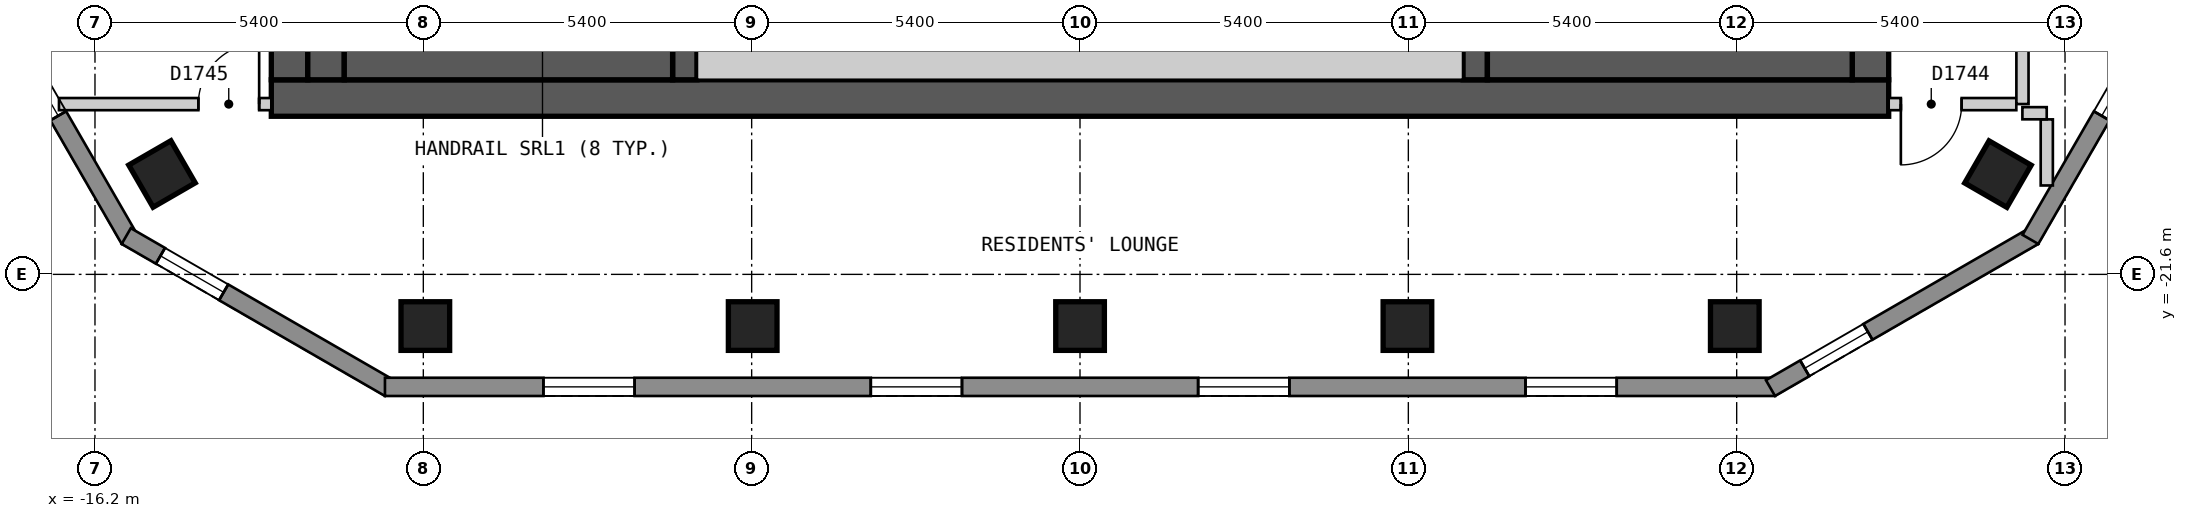
"""IFC4 building model, lengths in metres.
Left out: names, types, materials, properties, quantities, classifications, styles, units other than length and angle.
Written with IfcOpenShell. Run it as: python <this file> out.ifc"""

import sys

from ifc_helpers import new_model, si_unit, direction, frame, frame_2d, origin, origin_2d, place, context, subcontext, project, spatial, polyline, rectangle, outline, extrude, element, fill, save


model = new_model("IFC4")
c1 = context("Model", 3, precision=1e-05, world=origin(), true_north=direction((0.0, 1.0)))
c2 = subcontext(c1, "Body", "Model", "MODEL_VIEW")
j1 = project(units=[si_unit("LENGTHUNIT", "METRE"), si_unit("PLANEANGLEUNIT", "RADIAN")], contexts=[c1])
p1 = place(None, origin())
s1 = spatial("IfcSite", under=j1, at=p1, CompositionType="ELEMENT")
p2 = place(p1, origin())
s2 = spatial("IfcBuilding", under=s1, at=p2, CompositionType="ELEMENT")
p3 = place(p2, frame((0.0, 0.0, 187.2)))
s3 = spatial("IfcBuildingStorey", under=s2, at=p3, CompositionType="ELEMENT", Elevation=187.2)
for number, where, z_axis, x_axis in (
    (1, (-15.098, -19.949, 0.0), (0.0, 0.0, 1.0), (0.5, -0.866, 0.0)),
    (2, (-10.767, -22.45, 0.0), (0.0, 0.0, 1.0), (1.0, 0.0, 0.0)),
    (3, (-5.383, -22.45, 0.0), (0.0, 0.0, 1.0), (1.0, 0.0, 0.0)),
    (4, (0.001, -22.45, 0.0), (0.0, 0.0, 1.0), (1.0, 0.0, 0.0)),
    (5, (5.385, -22.45, 0.0), (0.0, 0.0, 1.0), (1.0, 0.0, 0.0)),
    (6, (10.769, -22.45, 0.0), (0.0, 0.0, 1.0), (1.0, 0.0, 0.0)),
    (7, (15.097, -19.951, 0.0), (0.0, 0.0, 1.0), (0.5, 0.866, 0.0)),
):
    element("IfcColumn", number, at=place(p3, frame(where, z_axis=z_axis, x_axis=x_axis)), inside=s3, PredefinedType="COLUMN", context=c2, shape_type="SweptSolid", body=[
        extrude(rectangle(XDim=0.8, YDim=0.8, at=origin_2d()), origin(), (0.0, 0.0, 1.0), 3.0),
    ])
p4 = place(p3, frame((-13.3, -18.7, 0.0), z_axis=(0.0, 0.0, 1.0), x_axis=(1.0, 0.0, 0.0)))
e8 = element("IfcWall", 8, at=p4, inside=s3, PredefinedType="SHEAR", context=c2, shape_type="SweptSolid", body=[
    extrude(rectangle(XDim=26.6, YDim=0.6, at=frame_2d((13.3, 0.0))), origin(), (0.0, 0.0, 1.0), 2.7),
])
p5 = place(p3, frame((-13.0, -18.4, 0.0), z_axis=(0.0, 0.0, 1.0), x_axis=(0.0, 1.0, 0.0)))
e9 = element("IfcWall", 9, at=p5, inside=s3, PredefinedType="SHEAR", context=c2, shape_type="SweptSolid", body=[
    extrude(rectangle(XDim=12.8, YDim=0.6, at=frame_2d((6.4, 0.0))), origin(), (0.0, 0.0, 1.0), 2.7),
])
p6 = place(p5, frame((4.2, 0.0, 0.0)))
e10 = element("IfcOpeningElement", 10, at=p6, cuts=e9, PredefinedType="OPENING", context=c2, shape_type="SweptSolid", body=[
    extrude(rectangle(XDim=1.2, YDim=2.1, at=frame_2d((0.6, 1.05))), frame((0.0, 0.31, 0.0), z_axis=(0.0, -1.0, 0.0), x_axis=(1.0, 0.0, 0.0)), (0.0, 0.0, 1.0), 0.62),
])
p7 = place(p3, frame((13.0, -18.4, 0.0), z_axis=(0.0, 0.0, 1.0), x_axis=(0.0, 1.0, 0.0)))
e11 = element("IfcWall", 11, at=p7, inside=s3, PredefinedType="SHEAR", context=c2, shape_type="SweptSolid", body=[
    extrude(rectangle(XDim=12.8, YDim=0.6, at=frame_2d((6.4, 0.0))), origin(), (0.0, 0.0, 1.0), 2.7),
])
for number, where, z_axis, x_axis in (
    (12, (-6.5, -18.4, 0.0), (0.0, 0.0, 1.0), (0.0, 1.0, 0.0)),
    (13, (6.5, -18.4, 0.0), (0.0, 0.0, 1.0), (0.0, 1.0, 0.0)),
):
    element("IfcWall", number, at=place(p3, frame(where, z_axis=z_axis, x_axis=x_axis)), inside=s3, PredefinedType="SHEAR", context=c2, shape_type="SweptSolid", body=[
        extrude(rectangle(XDim=3.55, YDim=0.4, at=frame_2d((1.775, 0.0))), origin(), (0.0, 0.0, 1.0), 2.7),
    ])
p8 = place(p3, frame((-26.024, -3.025, 0.0), z_axis=(0.0, 0.0, 1.0), x_axis=(0.500018670445, -0.86601462413, 0.0)))
e14 = element("IfcWall", 14, at=p8, inside=s3, PredefinedType="SOLIDWALL", context=c2, shape_type="SweptSolid", body=[
    extrude(outline(polyline([(0.0, -0.15), (20.785, -0.15), (20.705, 0.15), (0.08, 0.15), (0.0, -0.15)])), origin(), (0.0, 0.0, 1.0), 2.7),
])
p9 = place(p8, frame((2.346, 0.0, 0.15)))
e15 = element("IfcOpeningElement", 15, at=p9, cuts=e14, PredefinedType="OPENING", context=c2, shape_type="SweptSolid", body=[
    extrude(rectangle(XDim=1.5, YDim=2.1, at=frame_2d((0.75, 1.05))), frame((0.0, 0.16, 0.0), z_axis=(0.0, -1.0, 0.0), x_axis=(1.0, 0.0, 0.0)), (0.0, 0.0, 1.0), 0.32),
])
p10 = place(p8, frame((7.21, 0.0, 0.15)))
e16 = element("IfcOpeningElement", 16, at=p10, cuts=e14, PredefinedType="OPENING", context=c2, shape_type="SweptSolid", body=[
    extrude(rectangle(XDim=1.5, YDim=2.1, at=frame_2d((0.75, 1.05))), frame((0.0, 0.16, 0.0), z_axis=(0.0, -1.0, 0.0), x_axis=(1.0, 0.0, 0.0)), (0.0, 0.0, 1.0), 0.32),
])
p11 = place(p8, frame((12.073, 0.0, 0.15)))
e17 = element("IfcOpeningElement", 17, at=p11, cuts=e14, PredefinedType="OPENING", context=c2, shape_type="SweptSolid", body=[
    extrude(rectangle(XDim=1.5, YDim=2.1, at=frame_2d((0.75, 1.05))), frame((0.0, 0.16, 0.0), z_axis=(0.0, -1.0, 0.0), x_axis=(1.0, 0.0, 0.0)), (0.0, 0.0, 1.0), 0.32),
])
p12 = place(p8, frame((16.938, 0.0, 0.15)))
e18 = element("IfcOpeningElement", 18, at=p12, cuts=e14, PredefinedType="OPENING", context=c2, shape_type="SweptSolid", body=[
    extrude(rectangle(XDim=1.5, YDim=2.1, at=frame_2d((0.75, 1.05))), frame((0.0, 0.16, 0.0), z_axis=(0.0, -1.0, 0.0), x_axis=(1.0, 0.0, 0.0)), (0.0, 0.0, 1.0), 0.32),
])
p13 = place(p3, frame((-15.686, -20.97, 0.0), z_axis=(0.0, 0.0, 1.0), x_axis=(0.866022959057, -0.500004234368, 0.0)))
e19 = element("IfcWall", 19, at=p13, inside=s3, PredefinedType="SOLIDWALL", context=c2, shape_type="SweptSolid", body=[
    extrude(outline(polyline([(0.0, -0.15), (5.0, -0.15), (4.92, 0.15), (0.08, 0.15), (0.0, -0.15)])), origin(), (0.0, 0.0, 1.0), 2.7),
])
p14 = place(p13, frame((0.65, 0.0, 0.15)))
e20 = element("IfcOpeningElement", 20, at=p14, cuts=e19, PredefinedType="OPENING", context=c2, shape_type="SweptSolid", body=[
    extrude(rectangle(XDim=1.2, YDim=2.1, at=frame_2d((0.6, 1.05))), frame((0.0, 0.16, 0.0), z_axis=(0.0, -1.0, 0.0), x_axis=(1.0, 0.0, 0.0)), (0.0, 0.0, 1.0), 0.32),
])
p15 = place(p3, frame((-11.431, -23.45, 0.0), z_axis=(0.0, 0.0, 1.0), x_axis=(1.0, 0.0, 0.0)))
e21 = element("IfcWall", 21, at=p15, inside=s3, PredefinedType="SOLIDWALL", context=c2, shape_type="SweptSolid", body=[
    extrude(outline(polyline([(0.0, -0.15), (22.862, -0.15), (22.781, 0.15), (0.08, 0.15), (0.0, -0.15)])), origin(), (0.0, 0.0, 1.0), 2.7),
])
p16 = place(p15, frame((2.606, 0.0, 0.15)))
e22 = element("IfcOpeningElement", 22, at=p16, cuts=e21, PredefinedType="OPENING", context=c2, shape_type="SweptSolid", body=[
    extrude(rectangle(XDim=1.5, YDim=2.1, at=frame_2d((0.75, 1.05))), frame((0.0, 0.16, 0.0), z_axis=(0.0, -1.0, 0.0), x_axis=(1.0, 0.0, 0.0)), (0.0, 0.0, 1.0), 0.32),
])
p17 = place(p15, frame((7.99, 0.0, 0.15)))
e23 = element("IfcOpeningElement", 23, at=p17, cuts=e21, PredefinedType="OPENING", context=c2, shape_type="SweptSolid", body=[
    extrude(rectangle(XDim=1.5, YDim=2.1, at=frame_2d((0.75, 1.05))), frame((0.0, 0.16, 0.0), z_axis=(0.0, -1.0, 0.0), x_axis=(1.0, 0.0, 0.0)), (0.0, 0.0, 1.0), 0.32),
])
p18 = place(p15, frame((13.374, 0.0, 0.15)))
e24 = element("IfcOpeningElement", 24, at=p18, cuts=e21, PredefinedType="OPENING", context=c2, shape_type="SweptSolid", body=[
    extrude(rectangle(XDim=1.5, YDim=2.1, at=frame_2d((0.75, 1.05))), frame((0.0, 0.16, 0.0), z_axis=(0.0, -1.0, 0.0), x_axis=(1.0, 0.0, 0.0)), (0.0, 0.0, 1.0), 0.32),
])
p19 = place(p15, frame((18.758, 0.0, 0.15)))
e25 = element("IfcOpeningElement", 25, at=p19, cuts=e21, PredefinedType="OPENING", context=c2, shape_type="SweptSolid", body=[
    extrude(rectangle(XDim=1.5, YDim=2.1, at=frame_2d((0.75, 1.05))), frame((0.0, 0.16, 0.0), z_axis=(0.0, -1.0, 0.0), x_axis=(1.0, 0.0, 0.0)), (0.0, 0.0, 1.0), 0.32),
])
p20 = place(p3, frame((11.356, -23.47, 0.0), z_axis=(0.0, 0.0, 1.0), x_axis=(0.866022959057, 0.500004234368, 0.0)))
e26 = element("IfcWall", 26, at=p20, inside=s3, PredefinedType="SOLIDWALL", context=c2, shape_type="SweptSolid", body=[
    extrude(outline(polyline([(0.0, -0.15), (5.0, -0.15), (4.92, 0.15), (0.08, 0.15), (0.0, -0.15)])), origin(), (0.0, 0.0, 1.0), 2.7),
])
p21 = place(p20, frame((0.65, 0.0, 0.15)))
e27 = element("IfcOpeningElement", 27, at=p21, cuts=e26, PredefinedType="OPENING", context=c2, shape_type="SweptSolid", body=[
    extrude(rectangle(XDim=1.2, YDim=2.1, at=frame_2d((0.6, 1.05))), frame((0.0, 0.16, 0.0), z_axis=(0.0, -1.0, 0.0), x_axis=(1.0, 0.0, 0.0)), (0.0, 0.0, 1.0), 0.32),
])
p22 = place(p3, frame((15.631, -21.025, 0.0), z_axis=(0.0, 0.0, 1.0), x_axis=(0.500018670445, 0.86601462413, 0.0)))
e28 = element("IfcWall", 28, at=p22, inside=s3, PredefinedType="SOLIDWALL", context=c2, shape_type="SweptSolid", body=[
    extrude(outline(polyline([(0.0, -0.15), (20.785, -0.15), (20.705, 0.15), (0.08, 0.15), (0.0, -0.15)])), origin(), (0.0, 0.0, 1.0), 2.7),
])
p23 = place(p22, frame((2.346, 0.0, 0.15)))
e29 = element("IfcOpeningElement", 29, at=p23, cuts=e28, PredefinedType="OPENING", context=c2, shape_type="SweptSolid", body=[
    extrude(rectangle(XDim=1.5, YDim=2.1, at=frame_2d((0.75, 1.05))), frame((0.0, 0.16, 0.0), z_axis=(0.0, -1.0, 0.0), x_axis=(1.0, 0.0, 0.0)), (0.0, 0.0, 1.0), 0.32),
])
p24 = place(p22, frame((7.21, 0.0, 0.15)))
e30 = element("IfcOpeningElement", 30, at=p24, cuts=e28, PredefinedType="OPENING", context=c2, shape_type="SweptSolid", body=[
    extrude(rectangle(XDim=1.5, YDim=2.1, at=frame_2d((0.75, 1.05))), frame((0.0, 0.16, 0.0), z_axis=(0.0, -1.0, 0.0), x_axis=(1.0, 0.0, 0.0)), (0.0, 0.0, 1.0), 0.32),
])
p25 = place(p22, frame((12.073, 0.0, 0.15)))
e31 = element("IfcOpeningElement", 31, at=p25, cuts=e28, PredefinedType="OPENING", context=c2, shape_type="SweptSolid", body=[
    extrude(rectangle(XDim=1.5, YDim=2.1, at=frame_2d((0.75, 1.05))), frame((0.0, 0.16, 0.0), z_axis=(0.0, -1.0, 0.0), x_axis=(1.0, 0.0, 0.0)), (0.0, 0.0, 1.0), 0.32),
])
p26 = place(p22, frame((16.938, 0.0, 0.15)))
e32 = element("IfcOpeningElement", 32, at=p26, cuts=e28, PredefinedType="OPENING", context=c2, shape_type="SweptSolid", body=[
    extrude(rectangle(XDim=1.5, YDim=2.1, at=frame_2d((0.75, 1.05))), frame((0.0, 0.16, 0.0), z_axis=(0.0, -1.0, 0.0), x_axis=(1.0, 0.0, 0.0)), (0.0, 0.0, 1.0), 0.32),
])
p27 = place(p3, frame((13.3, -18.8, 0.0), z_axis=(0.0, 0.0, 1.0), x_axis=(1.0, 0.0, 0.0)))
e33 = element("IfcWall", 33, at=p27, inside=s3, PredefinedType="PARTITIONING", context=c2, shape_type="SweptSolid", body=[
    extrude(rectangle(XDim=2.099, YDim=0.2, at=frame_2d((1.049, 0.0))), origin(), (0.0, 0.0, 1.0), 2.7),
])
p28 = place(p27, frame((0.2, 0.0, 0.0)))
e34 = element("IfcOpeningElement", 34, at=p28, cuts=e33, PredefinedType="OPENING", context=c2, shape_type="SweptSolid", body=[
    extrude(rectangle(XDim=1.0, YDim=2.1, at=frame_2d((0.5, 1.05))), frame((0.0, 0.11, 0.0), z_axis=(0.0, -1.0, 0.0), x_axis=(1.0, 0.0, 0.0)), (0.0, 0.0, 1.0), 0.22),
])
p29 = place(p3, frame((15.5, -18.799, 0.0), z_axis=(0.0, 0.0, 1.0), x_axis=(0.0, 1.0, 0.0)))
e35 = element("IfcWall", 35, at=p29, inside=s3, PredefinedType="PARTITIONING", context=c2, shape_type="SweptSolid", body=[
    extrude(rectangle(XDim=15.349, YDim=0.2, at=frame_2d((7.675, 0.0))), origin(), (0.0, 0.0, 1.0), 2.7),
])
p30 = place(p29, frame((11.348, 0.0, 0.0)))
e36 = element("IfcOpeningElement", 36, at=p30, cuts=e35, PredefinedType="OPENING", context=c2, shape_type="SweptSolid", body=[
    extrude(rectangle(XDim=1.0, YDim=2.1, at=frame_2d((0.5, 1.05))), frame((0.0, 0.11, 0.0), z_axis=(0.0, -1.0, 0.0), x_axis=(1.0, 0.0, 0.0)), (0.0, 0.0, 1.0), 0.22),
])
p31 = place(p3, frame((15.9, -19.051, 0.0), z_axis=(0.0, 0.0, 1.0), x_axis=(0.0, -1.0, 0.0)))
e37 = element("IfcWall", 37, at=p31, inside=s3, PredefinedType="PARTITIONING", context=c2, shape_type="SweptSolid", body=[
    extrude(rectangle(XDim=1.087, YDim=0.2, at=frame_2d((0.543, 0.0))), origin(), (0.0, 0.0, 1.0), 2.7),
])
p32 = place(p3, frame((15.499, -18.95, 0.0), z_axis=(0.0, 0.0, 1.0), x_axis=(1.0, 0.0, 0.0)))
e38 = element("IfcWall", 38, at=p32, inside=s3, PredefinedType="PARTITIONING", context=c2, shape_type="SweptSolid", body=[
    extrude(rectangle(XDim=0.4, YDim=0.2, at=frame_2d((0.2, 0.0))), origin(), (0.0, 0.0, 1.0), 2.7),
])
p33 = place(p3, frame((-16.792, -18.8, 0.0), z_axis=(0.0, 0.0, 1.0), x_axis=(1.0, 0.0, 0.0)))
e39 = element("IfcWall", 39, at=p33, inside=s3, PredefinedType="PARTITIONING", context=c2, shape_type="SweptSolid", body=[
    extrude(rectangle(XDim=3.492, YDim=0.2, at=frame_2d((1.746, 0.0))), origin(), (0.0, 0.0, 1.0), 2.7),
])
p34 = place(p33, frame((2.292, 0.0, 0.0)))
e40 = element("IfcOpeningElement", 40, at=p34, cuts=e39, PredefinedType="OPENING", context=c2, shape_type="SweptSolid", body=[
    extrude(rectangle(XDim=1.0, YDim=2.1, at=frame_2d((0.5, 1.05))), frame((0.0, 0.11, 0.0), z_axis=(0.0, -1.0, 0.0), x_axis=(1.0, 0.0, 0.0)), (0.0, 0.0, 1.0), 0.22),
])
p35 = place(p3, frame((-12.4, -18.4, 0.0), z_axis=(0.0, 0.0, 1.0), x_axis=(0.0, 1.0, 0.0)))
e41 = element("IfcWall", 41, at=p35, inside=s3, PredefinedType="SOLIDWALL", context=c2, shape_type="SweptSolid", body=[
    extrude(rectangle(XDim=3.55, YDim=0.6, at=frame_2d((1.775, 0.0))), origin(), (0.0, 0.0, 1.0), 2.7),
])
p36 = place(p3, frame((-12.1, -18.1, 0.0), z_axis=(0.0, 0.0, 1.0), x_axis=(1.0, 0.0, 0.0)))
e42 = element("IfcWall", 42, at=p36, inside=s3, PredefinedType="SOLIDWALL", context=c2, shape_type="SweptSolid", body=[
    extrude(rectangle(XDim=5.4, YDim=0.6, at=frame_2d((2.7, 0.0))), origin(), (0.0, 0.0, 1.0), 2.7),
])
p37 = place(p3, frame((-6.3, -18.1, 0.0), z_axis=(0.0, 0.0, 1.0), x_axis=(1.0, 0.0, 0.0)))
e43 = element("IfcWall", 43, at=p37, inside=s3, PredefinedType="PARTITIONING", context=c2, shape_type="SweptSolid", body=[
    extrude(rectangle(XDim=12.6, YDim=0.6, at=frame_2d((6.3, 0.0))), origin(), (0.0, 0.0, 1.0), 2.7),
])
p38 = place(p3, frame((6.7, -18.0, 0.0), z_axis=(0.0, 0.0, 1.0), x_axis=(1.0, 0.0, 0.0)))
e44 = element("IfcWall", 44, at=p38, inside=s3, PredefinedType="SOLIDWALL", context=c2, shape_type="SweptSolid", body=[
    extrude(rectangle(XDim=6.0, YDim=0.8, at=frame_2d((3.0, 0.0))), origin(), (0.0, 0.0, 1.0), 2.7),
])
p39 = place(p12, origin())
e45 = element("IfcWindow", 45, at=p39, inside=s3, PartitioningType="SINGLE_PANEL", PredefinedType="WINDOW", context=c2, shape_type="SweptSolid", body=[
    extrude(rectangle(XDim=1.5, YDim=2.1, at=frame_2d((0.75, 1.05))), frame((0.0, 0.03, 0.0), z_axis=(0.0, -1.0, 0.0), x_axis=(1.0, 0.0, 0.0)), (0.0, 0.0, 1.0), 0.06),
])
fill(e18, e45)
p40 = place(p14, origin())
e46 = element("IfcWindow", 46, at=p40, inside=s3, PartitioningType="SINGLE_PANEL", PredefinedType="WINDOW", context=c2, shape_type="SweptSolid", body=[
    extrude(rectangle(XDim=1.2, YDim=2.1, at=frame_2d((0.6, 1.05))), frame((0.0, 0.03, 0.0), z_axis=(0.0, -1.0, 0.0), x_axis=(1.0, 0.0, 0.0)), (0.0, 0.0, 1.0), 0.06),
])
fill(e20, e46)
p41 = place(p16, origin())
e47 = element("IfcWindow", 47, at=p41, inside=s3, PartitioningType="SINGLE_PANEL", PredefinedType="WINDOW", context=c2, shape_type="SweptSolid", body=[
    extrude(rectangle(XDim=1.5, YDim=2.1, at=frame_2d((0.75, 1.05))), frame((0.0, 0.03, 0.0), z_axis=(0.0, -1.0, 0.0), x_axis=(1.0, 0.0, 0.0)), (0.0, 0.0, 1.0), 0.06),
])
fill(e22, e47)
p42 = place(p17, origin())
e48 = element("IfcWindow", 48, at=p42, inside=s3, PartitioningType="SINGLE_PANEL", PredefinedType="WINDOW", context=c2, shape_type="SweptSolid", body=[
    extrude(rectangle(XDim=1.5, YDim=2.1, at=frame_2d((0.75, 1.05))), frame((0.0, 0.03, 0.0), z_axis=(0.0, -1.0, 0.0), x_axis=(1.0, 0.0, 0.0)), (0.0, 0.0, 1.0), 0.06),
])
fill(e23, e48)
p43 = place(p18, origin())
e49 = element("IfcWindow", 49, at=p43, inside=s3, PartitioningType="SINGLE_PANEL", PredefinedType="WINDOW", context=c2, shape_type="SweptSolid", body=[
    extrude(rectangle(XDim=1.5, YDim=2.1, at=frame_2d((0.75, 1.05))), frame((0.0, 0.03, 0.0), z_axis=(0.0, -1.0, 0.0), x_axis=(1.0, 0.0, 0.0)), (0.0, 0.0, 1.0), 0.06),
])
fill(e24, e49)
p44 = place(p19, origin())
e50 = element("IfcWindow", 50, at=p44, inside=s3, PartitioningType="SINGLE_PANEL", PredefinedType="WINDOW", context=c2, shape_type="SweptSolid", body=[
    extrude(rectangle(XDim=1.5, YDim=2.1, at=frame_2d((0.75, 1.05))), frame((0.0, 0.03, 0.0), z_axis=(0.0, -1.0, 0.0), x_axis=(1.0, 0.0, 0.0)), (0.0, 0.0, 1.0), 0.06),
])
fill(e25, e50)
p45 = place(p21, origin())
e51 = element("IfcWindow", 51, at=p45, inside=s3, PartitioningType="SINGLE_PANEL", PredefinedType="WINDOW", context=c2, shape_type="SweptSolid", body=[
    extrude(rectangle(XDim=1.2, YDim=2.1, at=frame_2d((0.6, 1.05))), frame((0.0, 0.03, 0.0), z_axis=(0.0, -1.0, 0.0), x_axis=(1.0, 0.0, 0.0)), (0.0, 0.0, 1.0), 0.06),
])
fill(e27, e51)
p46 = place(p23, origin())
e52 = element("IfcWindow", 52, at=p46, inside=s3, PartitioningType="SINGLE_PANEL", PredefinedType="WINDOW", context=c2, shape_type="SweptSolid", body=[
    extrude(rectangle(XDim=1.5, YDim=2.1, at=frame_2d((0.75, 1.05))), frame((0.0, 0.03, 0.0), z_axis=(0.0, -1.0, 0.0), x_axis=(1.0, 0.0, 0.0)), (0.0, 0.0, 1.0), 0.06),
])
fill(e29, e52)
p47 = place(p28, origin())
e53 = element("IfcDoor", 53, at=p47, inside=s3, OperationType="SINGLE_SWING_LEFT", PredefinedType="DOOR", context=c2, shape_type="SweptSolid", body=[
    extrude(rectangle(XDim=1.0, YDim=2.1, at=frame_2d((0.5, 1.05))), frame((0.0, 0.025, 0.0), z_axis=(0.0, -1.0, 0.0), x_axis=(1.0, 0.0, 0.0)), (0.0, 0.0, 1.0), 0.05),
])
fill(e34, e53)
p48 = place(p34, origin())
e54 = element("IfcDoor", 54, at=p48, inside=s3, OperationType="SINGLE_SWING_RIGHT", PredefinedType="DOOR", context=c2, shape_type="SweptSolid", body=[
    extrude(rectangle(XDim=1.0, YDim=2.1, at=frame_2d((0.5, 1.05))), frame((0.0, 0.025, 0.0), z_axis=(0.0, -1.0, 0.0), x_axis=(1.0, 0.0, 0.0)), (0.0, 0.0, 1.0), 0.05),
])
fill(e40, e54)
save(model, sys.argv[1])
